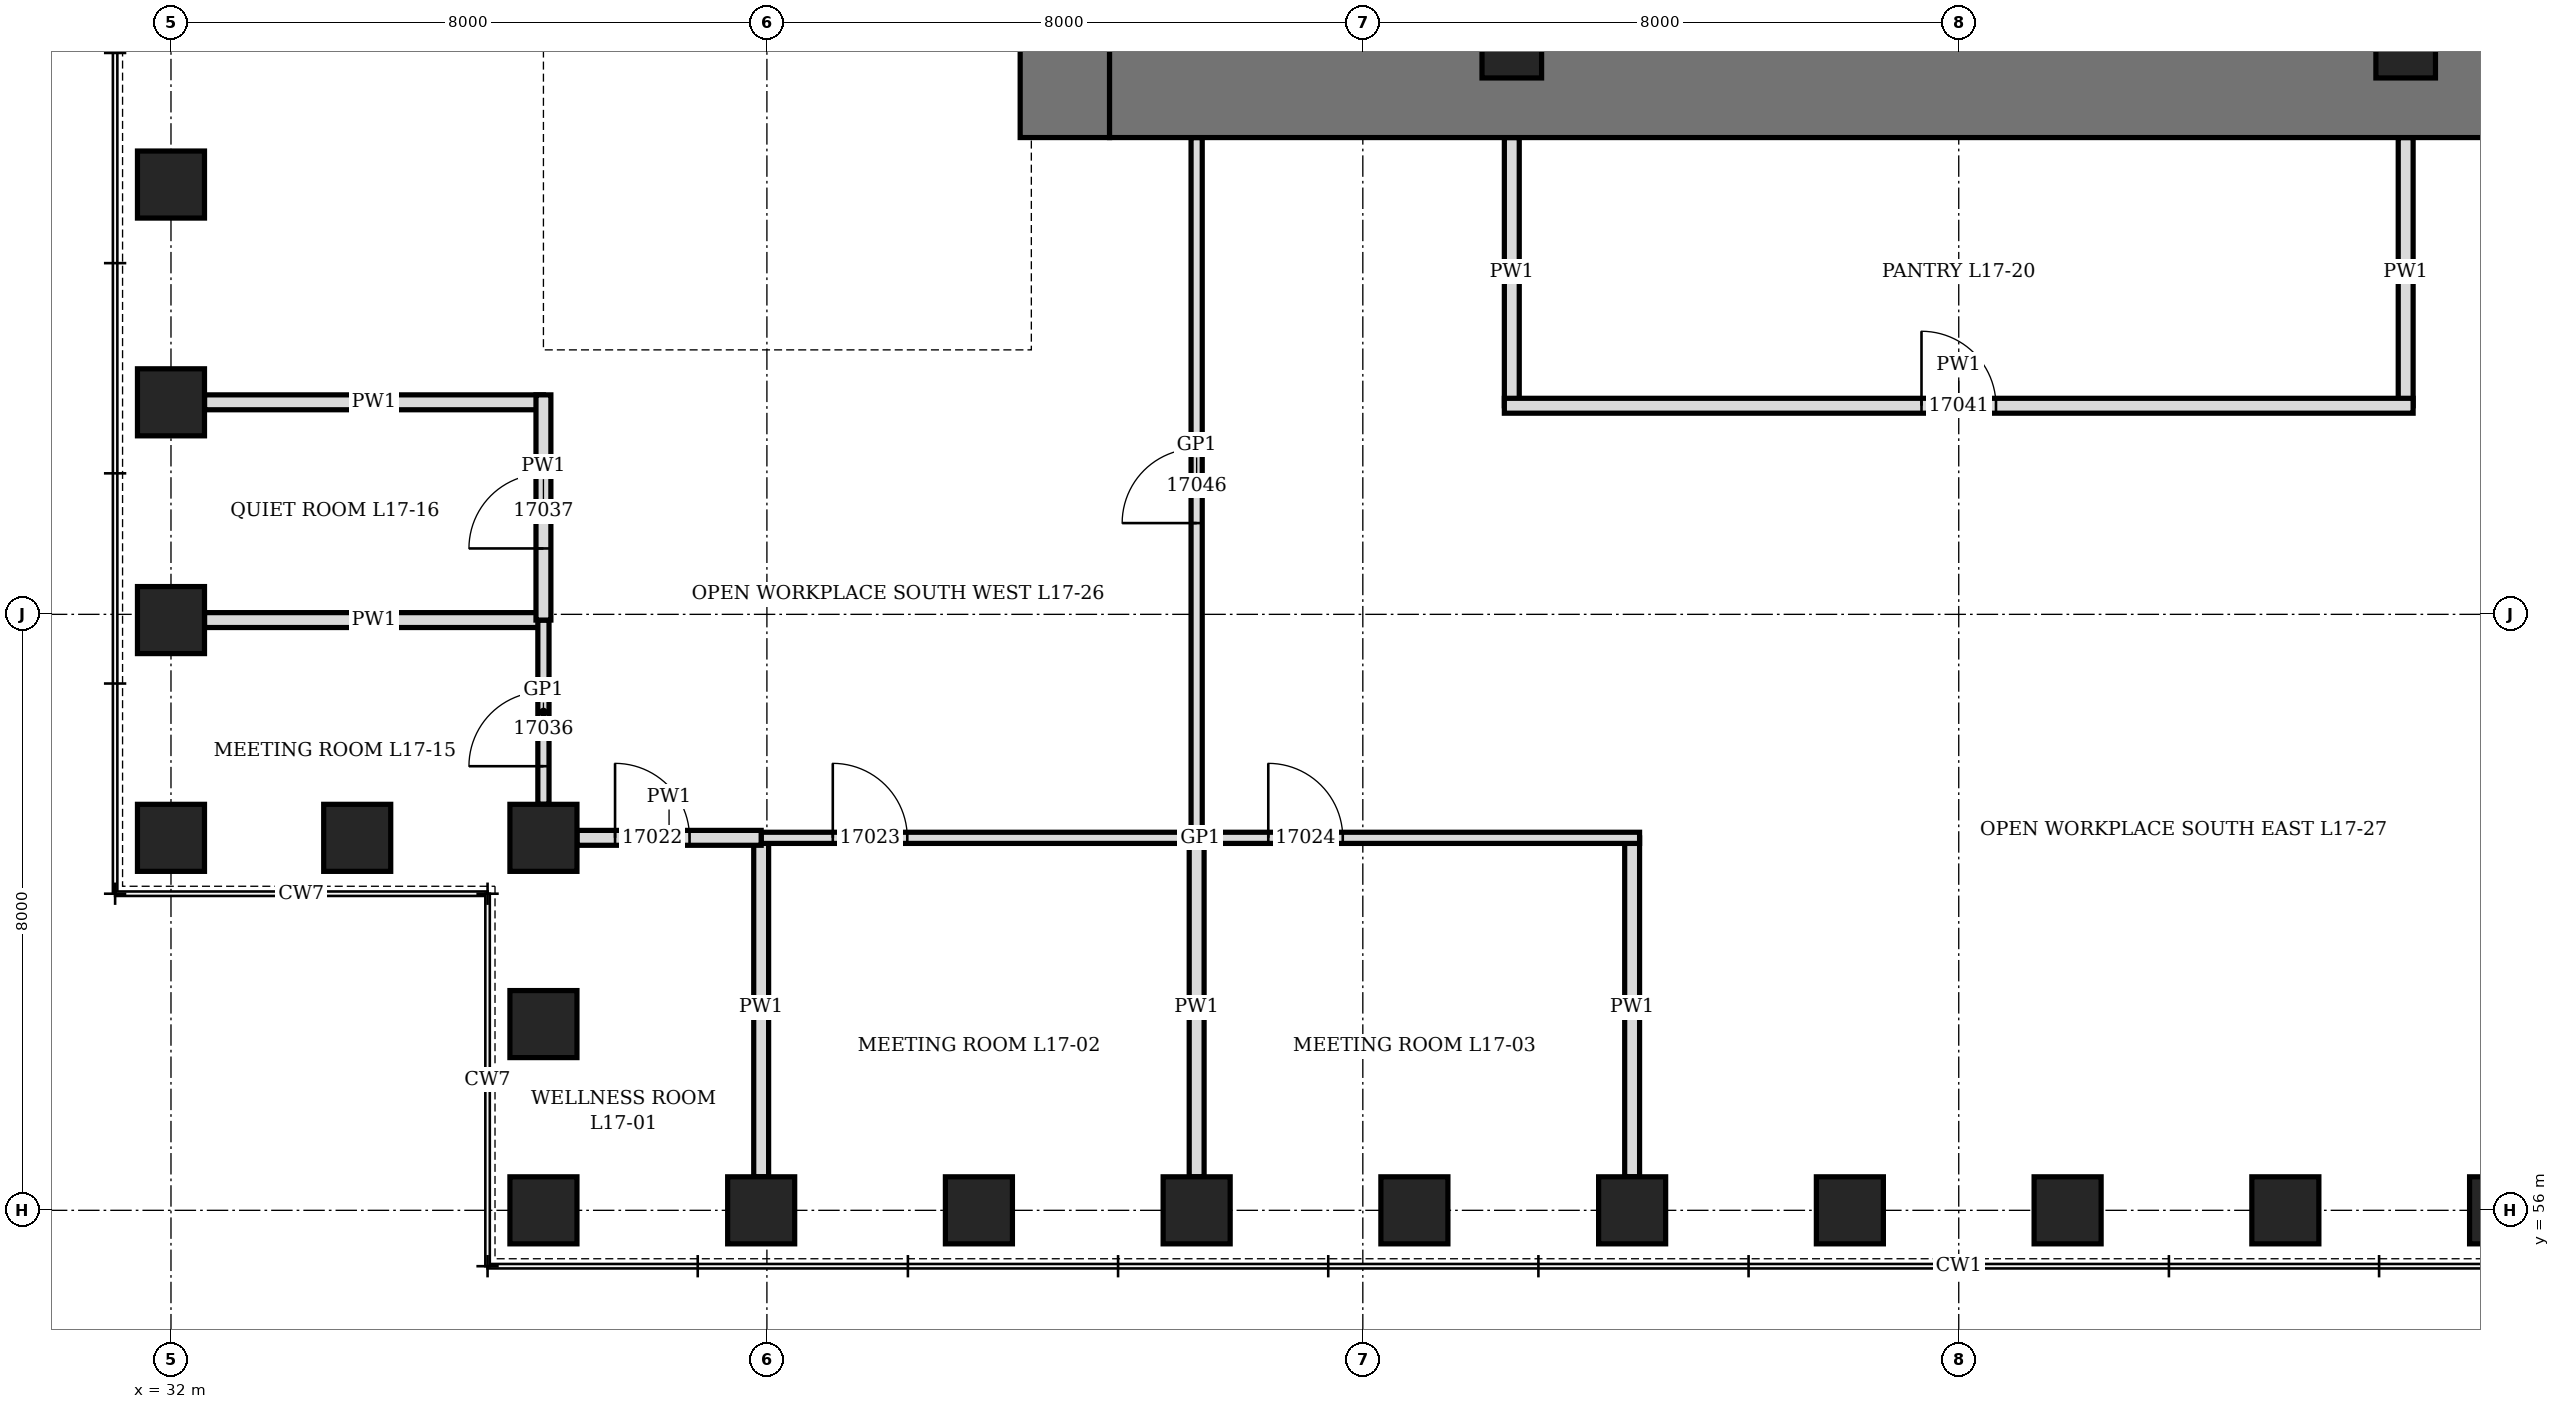
"""IFC4 building model, lengths in metres.
Left out: names, types, materials, properties, quantities, classifications, styles, units other than length and angle.
Written with IfcOpenShell. Run it as: python <this file> out.ifc"""

import sys

from ifc_helpers import new_model, si_unit, direction, frame, frame_2d, origin, origin_2d, place, context, subcontext, project, spatial, rectangle, hollow_rectangle, extrude, element, fill, save


model = new_model("IFC4")
c1 = context("Model", 3, precision=1e-05, world=origin(), true_north=direction((0.0, 1.0)))
c2 = subcontext(c1, "Body", "Model", "MODEL_VIEW")
j1 = project(units=[si_unit("LENGTHUNIT", "METRE"), si_unit("PLANEANGLEUNIT", "RADIAN")], contexts=[c1])
p1 = place(None, origin())
s1 = spatial("IfcSite", under=j1, at=p1, CompositionType="ELEMENT")
p2 = place(p1, origin())
s2 = spatial("IfcBuilding", under=s1, at=p2, CompositionType="ELEMENT")
p3 = place(p2, frame((0.0, 0.0, 81.1)))
s3 = spatial("IfcBuildingStorey", under=s2, at=p3, CompositionType="ELEMENT", Elevation=81.1)
for number, where, z_axis, x_axis in (
    (1, (37.0, 56.0, 0.0), (0.0, 0.0, 1.0), (1.0, 0.0, 0.0)),
    (2, (39.923, 56.0, 0.0), (0.0, 0.0, 1.0), (1.0, 0.0, 0.0)),
    (3, (42.846, 56.0, 0.0), (0.0, 0.0, 1.0), (1.0, 0.0, 0.0)),
    (4, (45.769, 56.0, 0.0), (0.0, 0.0, 1.0), (1.0, 0.0, 0.0)),
    (5, (48.692, 56.0, 0.0), (0.0, 0.0, 1.0), (1.0, 0.0, 0.0)),
    (6, (51.615, 56.0, 0.0), (0.0, 0.0, 1.0), (1.0, 0.0, 0.0)),
    (7, (54.539, 56.0, 0.0), (0.0, 0.0, 1.0), (1.0, 0.0, 0.0)),
    (8, (57.461, 56.0, 0.0), (0.0, 0.0, 1.0), (1.0, 0.0, 0.0)),
    (9, (60.385, 56.0, 0.0), (0.0, 0.0, 1.0), (1.0, 0.0, 0.0)),
    (10, (63.308, 56.0, 0.0), (0.0, 0.0, 1.0), (1.0, 0.0, 0.0)),
    (11, (32.0, 69.769, 0.0), (0.0, 0.0, 1.0), (0.0, 1.0, 0.0)),
    (12, (32.0, 66.846, 0.0), (0.0, 0.0, 1.0), (0.0, 1.0, 0.0)),
    (13, (32.0, 63.923, 0.0), (0.0, 0.0, 1.0), (0.0, 1.0, 0.0)),
    (14, (32.0, 61.0, 0.0), (0.0, 0.0, 1.0), (1.0, 0.0, 0.0)),
    (15, (34.5, 61.0, 0.0), (0.0, 0.0, 1.0), (1.0, 0.0, 0.0)),
    (16, (37.0, 61.0, 0.0), (0.0, 0.0, 1.0), (0.0, 1.0, 0.0)),
    (17, (37.0, 58.5, 0.0), (0.0, 0.0, 1.0), (0.0, 1.0, 0.0)),
):
    element("IfcColumn", number, at=place(p3, frame(where, z_axis=z_axis, x_axis=x_axis)), inside=s3, PredefinedType="COLUMN", context=c2, shape_type="SweptSolid", body=[
        extrude(hollow_rectangle(XDim=0.9, YDim=0.9, WallThickness=0.12, at=origin_2d()), origin(), (0.0, 0.0, 1.0), 4.2),
    ])
p4 = place(p3, frame((44.0, 70.4, 0.0), z_axis=(0.0, 0.0, 1.0), x_axis=(0.0, 1.0, 0.0)))
e18 = element("IfcWall", 18, at=p4, inside=s3, PredefinedType="SHEAR", context=c2, shape_type="SweptSolid", body=[
    extrude(rectangle(XDim=19.2, YDim=1.2, at=frame_2d((9.6, 0.0))), origin(), (0.0, 0.0, 1.0), 4.2),
])
p5 = place(p4, frame((8.6, 0.0, 0.0)))
e19 = element("IfcOpeningElement", 19, at=p5, cuts=e18, PredefinedType="OPENING", context=c2, shape_type="SweptSolid", body=[
    extrude(rectangle(XDim=2.0, YDim=2.4, at=frame_2d((1.0, 1.2))), frame((0.0, 0.61, 0.0), z_axis=(0.0, -1.0, 0.0), x_axis=(1.0, 0.0, 0.0)), (0.0, 0.0, 1.0), 1.22),
])
p6 = place(p3, frame((44.6, 71.0, 0.0), z_axis=(0.0, 0.0, 1.0), x_axis=(1.0, 0.0, 0.0)))
e20 = element("IfcWall", 20, at=p6, inside=s3, PredefinedType="SHEAR", context=c2, shape_type="SweptSolid", body=[
    extrude(rectangle(XDim=22.8, YDim=1.2, at=frame_2d((11.4, 0.0))), origin(), (0.0, 0.0, 1.0), 4.2),
])
for number, where, z_axis, x_axis in (
    (21, (50.0, 71.6, 0.0), (0.0, 0.0, 1.0), (1.0, 0.0, 0.0)),
    (22, (62.0, 71.6, 0.0), (0.0, 0.0, 1.0), (1.0, 0.0, 0.0)),
):
    element("IfcColumn", number, at=place(p3, frame(where, z_axis=z_axis, x_axis=x_axis)), inside=s3, PredefinedType="COLUMN", context=c2, shape_type="SweptSolid", body=[
        extrude(hollow_rectangle(XDim=0.8, YDim=0.8, WallThickness=0.1, at=origin_2d()), origin(), (0.0, 0.0, 1.0), 4.2),
    ])
p7 = place(p3, frame((39.923, 56.45, 0.0), z_axis=(0.0, 0.0, 1.0), x_axis=(0.0, 1.0, 0.0)))
e23 = element("IfcWall", 23, at=p7, inside=s3, PredefinedType="PARTITIONING", context=c2, shape_type="SweptSolid", body=[
    extrude(rectangle(XDim=4.55, YDim=0.2, at=frame_2d((2.275, 0.0))), origin(), (0.0, 0.0, 1.0), 3.428),
])
for number, where, z_axis, x_axis in (
    (24, (45.769, 56.45, 0.0), (0.0, 0.0, 1.0), (0.0, 1.0, 0.0)),
    (25, (51.615, 56.45, 0.0), (0.0, 0.0, 1.0), (0.0, 1.0, 0.0)),
):
    element("IfcWall", number, at=place(p3, frame(where, z_axis=z_axis, x_axis=x_axis)), inside=s3, PredefinedType="PARTITIONING", context=c2, shape_type="SweptSolid", body=[
        extrude(rectangle(XDim=4.55, YDim=0.2, at=frame_2d((2.275, 0.0))), origin(), (0.0, 0.0, 1.0), 3.278),
    ])
for number, where, z_axis, x_axis in (
    (26, (32.45, 63.923, 0.0), (0.0, 0.0, 1.0), (1.0, 0.0, 0.0)),
    (27, (32.45, 66.846, 0.0), (0.0, 0.0, 1.0), (1.0, 0.0, 0.0)),
):
    element("IfcWall", number, at=place(p3, frame(where, z_axis=z_axis, x_axis=x_axis)), inside=s3, PredefinedType="PARTITIONING", context=c2, shape_type="SweptSolid", body=[
        extrude(rectangle(XDim=4.55, YDim=0.2, at=frame_2d((2.275, 0.0))), origin(), (0.0, 0.0, 1.0), 3.428),
    ])
for number, where, z_axis, x_axis in (
    (28, (50.0, 66.8, 0.0), (0.0, 0.0, 1.0), (0.0, 1.0, 0.0)),
    (29, (62.0, 66.8, 0.0), (0.0, 0.0, 1.0), (0.0, 1.0, 0.0)),
):
    element("IfcWall", number, at=place(p3, frame(where, z_axis=z_axis, x_axis=x_axis)), inside=s3, PredefinedType="PARTITIONING", context=c2, shape_type="SweptSolid", body=[
        extrude(rectangle(XDim=3.6, YDim=0.2, at=frame_2d((1.8, 0.0))), origin(), (0.0, 0.0, 1.0), 4.04),
    ])
p8 = place(p3, frame((39.923, 61.0, 0.0), z_axis=(0.0, 0.0, 1.0), x_axis=(1.0, 0.0, 0.0)))
e30 = element("IfcWall", 30, at=p8, inside=s3, PredefinedType="PARTITIONING", context=c2, shape_type="SweptSolid", body=[
    extrude(rectangle(XDim=11.792, YDim=0.15, at=frame_2d((5.896, 0.0))), origin(), (0.0, 0.0, 1.0), 4.04),
])
p9 = place(p8, frame((0.961, 0.0, 0.0)))
e31 = element("IfcOpeningElement", 31, at=p9, cuts=e30, PredefinedType="OPENING", context=c2, shape_type="SweptSolid", body=[
    extrude(rectangle(XDim=1.0, YDim=2.4, at=frame_2d((0.5, 1.2))), frame((0.0, 0.085, 0.0), z_axis=(0.0, -1.0, 0.0), x_axis=(1.0, 0.0, 0.0)), (0.0, 0.0, 1.0), 0.17),
])
p10 = place(p8, frame((6.808, 0.0, 0.0)))
e32 = element("IfcOpeningElement", 32, at=p10, cuts=e30, PredefinedType="OPENING", context=c2, shape_type="SweptSolid", body=[
    extrude(rectangle(XDim=1.0, YDim=2.4, at=frame_2d((0.5, 1.2))), frame((0.0, 0.085, 0.0), z_axis=(0.0, -1.0, 0.0), x_axis=(1.0, 0.0, 0.0)), (0.0, 0.0, 1.0), 0.17),
])
p11 = place(p3, frame((37.45, 61.0, 0.0), z_axis=(0.0, 0.0, 1.0), x_axis=(1.0, 0.0, 0.0)))
e33 = element("IfcWall", 33, at=p11, inside=s3, PredefinedType="PARTITIONING", context=c2, shape_type="SweptSolid", body=[
    extrude(rectangle(XDim=2.473, YDim=0.2, at=frame_2d((1.237, 0.0))), origin(), (0.0, 0.0, 1.0), 4.04),
])
p12 = place(p11, frame((0.511, 0.0, 0.0)))
e34 = element("IfcOpeningElement", 34, at=p12, cuts=e33, PredefinedType="OPENING", context=c2, shape_type="SweptSolid", body=[
    extrude(rectangle(XDim=1.0, YDim=2.1, at=frame_2d((0.5, 1.05))), frame((0.0, 0.11, 0.0), z_axis=(0.0, -1.0, 0.0), x_axis=(1.0, 0.0, 0.0)), (0.0, 0.0, 1.0), 0.22),
])
p13 = place(p3, frame((49.9, 66.8, 0.0), z_axis=(0.0, 0.0, 1.0), x_axis=(1.0, 0.0, 0.0)))
e35 = element("IfcWall", 35, at=p13, inside=s3, PredefinedType="PARTITIONING", context=c2, shape_type="SweptSolid", body=[
    extrude(rectangle(XDim=12.2, YDim=0.2, at=frame_2d((6.1, 0.0))), origin(), (0.0, 0.0, 1.0), 4.04),
])
p14 = place(p13, frame((5.6, 0.0, 0.0)))
e36 = element("IfcOpeningElement", 36, at=p14, cuts=e35, PredefinedType="OPENING", context=c2, shape_type="SweptSolid", body=[
    extrude(rectangle(XDim=1.0, YDim=2.1, at=frame_2d((0.5, 1.05))), frame((0.0, 0.11, 0.0), z_axis=(0.0, -1.0, 0.0), x_axis=(1.0, 0.0, 0.0)), (0.0, 0.0, 1.0), 0.22),
])
p15 = place(p3, frame((37.0, 61.45, 0.0), z_axis=(0.0, 0.0, 1.0), x_axis=(0.0, 1.0, 0.0)))
e37 = element("IfcWall", 37, at=p15, inside=s3, PredefinedType="PARTITIONING", context=c2, shape_type="SweptSolid", body=[
    extrude(rectangle(XDim=2.473, YDim=0.15, at=frame_2d((1.237, 0.0))), origin(), (0.0, 0.0, 1.0), 4.04),
])
p16 = place(p15, frame((0.511, 0.0, 0.0)))
e38 = element("IfcOpeningElement", 38, at=p16, cuts=e37, PredefinedType="OPENING", context=c2, shape_type="SweptSolid", body=[
    extrude(rectangle(XDim=1.0, YDim=2.4, at=frame_2d((0.5, 1.2))), frame((0.0, 0.085, 0.0), z_axis=(0.0, -1.0, 0.0), x_axis=(1.0, 0.0, 0.0)), (0.0, 0.0, 1.0), 0.17),
])
p17 = place(p3, frame((37.0, 63.923, 0.0), z_axis=(0.0, 0.0, 1.0), x_axis=(0.0, 1.0, 0.0)))
e39 = element("IfcWall", 39, at=p17, inside=s3, PredefinedType="PARTITIONING", context=c2, shape_type="SweptSolid", body=[
    extrude(rectangle(XDim=3.023, YDim=0.2, at=frame_2d((1.511, 0.0))), origin(), (0.0, 0.0, 1.0), 4.04),
])
p18 = place(p17, frame((0.961, 0.0, 0.0)))
e40 = element("IfcOpeningElement", 40, at=p18, cuts=e39, PredefinedType="OPENING", context=c2, shape_type="SweptSolid", body=[
    extrude(rectangle(XDim=1.0, YDim=2.1, at=frame_2d((0.5, 1.05))), frame((0.0, 0.11, 0.0), z_axis=(0.0, -1.0, 0.0), x_axis=(1.0, 0.0, 0.0)), (0.0, 0.0, 1.0), 0.22),
])
p19 = place(p3, frame((45.769, 61.05, 0.0), z_axis=(0.0, 0.0, 1.0), x_axis=(0.0, 1.0, 0.0)))
e41 = element("IfcWall", 41, at=p19, inside=s3, PredefinedType="PARTITIONING", context=c2, shape_type="SweptSolid", body=[
    extrude(rectangle(XDim=9.35, YDim=0.15, at=frame_2d((4.675, 0.0))), origin(), (0.0, 0.0, 1.0), 3.278),
])
p20 = place(p19, frame((4.175, 0.0, 0.0)))
e42 = element("IfcOpeningElement", 42, at=p20, cuts=e41, PredefinedType="OPENING", context=c2, shape_type="SweptSolid", body=[
    extrude(rectangle(XDim=1.0, YDim=2.4, at=frame_2d((0.5, 1.2))), frame((0.0, 0.085, 0.0), z_axis=(0.0, -1.0, 0.0), x_axis=(1.0, 0.0, 0.0)), (0.0, 0.0, 1.0), 0.17),
])
p21 = place(p12, origin())
e43 = element("IfcDoor", 43, at=p21, inside=s3, OperationType="SINGLE_SWING_LEFT", PredefinedType="DOOR", context=c2, shape_type="SweptSolid", body=[
    extrude(rectangle(XDim=1.0, YDim=2.1, at=frame_2d((0.5, 1.05))), frame((0.0, 0.1, 0.0), z_axis=(0.0, -1.0, 0.0), x_axis=(1.0, 0.0, 0.0)), (0.0, 0.0, 1.0), 0.199),
])
fill(e34, e43)
p22 = place(p9, origin())
e44 = element("IfcDoor", 44, at=p22, inside=s3, OperationType="SINGLE_SWING_RIGHT", PredefinedType="DOOR", context=c2, shape_type="SweptSolid", body=[
    extrude(rectangle(XDim=1.0, YDim=2.4, at=frame_2d((0.5, 1.2))), frame((0.0, 0.075, 0.0), z_axis=(0.0, -1.0, 0.0), x_axis=(1.0, 0.0, 0.0)), (0.0, 0.0, 1.0), 0.149),
])
fill(e31, e44)
p23 = place(p10, origin())
e45 = element("IfcDoor", 45, at=p23, inside=s3, OperationType="SINGLE_SWING_RIGHT", PredefinedType="DOOR", context=c2, shape_type="SweptSolid", body=[
    extrude(rectangle(XDim=1.0, YDim=2.4, at=frame_2d((0.5, 1.2))), frame((0.0, 0.075, 0.0), z_axis=(0.0, -1.0, 0.0), x_axis=(1.0, 0.0, 0.0)), (0.0, 0.0, 1.0), 0.149),
])
fill(e32, e45)
p24 = place(p16, origin())
e46 = element("IfcDoor", 46, at=p24, inside=s3, OperationType="SINGLE_SWING_RIGHT", PredefinedType="DOOR", context=c2, shape_type="SweptSolid", body=[
    extrude(rectangle(XDim=1.0, YDim=2.4, at=frame_2d((0.5, 1.2))), frame((0.0, 0.075, 0.0), z_axis=(0.0, -1.0, 0.0), x_axis=(1.0, 0.0, 0.0)), (0.0, 0.0, 1.0), 0.149),
])
fill(e38, e46)
p25 = place(p18, origin())
e47 = element("IfcDoor", 47, at=p25, inside=s3, OperationType="SINGLE_SWING_LEFT", PredefinedType="DOOR", context=c2, shape_type="SweptSolid", body=[
    extrude(rectangle(XDim=1.0, YDim=2.1, at=frame_2d((0.5, 1.05))), frame((0.0, 0.1, 0.0), z_axis=(0.0, -1.0, 0.0), x_axis=(1.0, 0.0, 0.0)), (0.0, 0.0, 1.0), 0.199),
])
fill(e40, e47)
p26 = place(p14, origin())
e48 = element("IfcDoor", 48, at=p26, inside=s3, OperationType="SINGLE_SWING_LEFT", PredefinedType="DOOR", context=c2, shape_type="SweptSolid", body=[
    extrude(rectangle(XDim=1.0, YDim=2.1, at=frame_2d((0.5, 1.05))), frame((0.0, 0.1, 0.0), z_axis=(0.0, -1.0, 0.0), x_axis=(1.0, 0.0, 0.0)), (0.0, 0.0, 1.0), 0.199),
])
fill(e36, e48)
p27 = place(p20, origin())
e49 = element("IfcDoor", 49, at=p27, inside=s3, OperationType="SINGLE_SWING_RIGHT", PredefinedType="DOOR", context=c2, shape_type="SweptSolid", body=[
    extrude(rectangle(XDim=1.0, YDim=2.4, at=frame_2d((0.5, 1.2))), frame((0.0, 0.075, 0.0), z_axis=(0.0, -1.0, 0.0), x_axis=(1.0, 0.0, 0.0)), (0.0, 0.0, 1.0), 0.149),
])
fill(e42, e49)
save(model, sys.argv[1])
